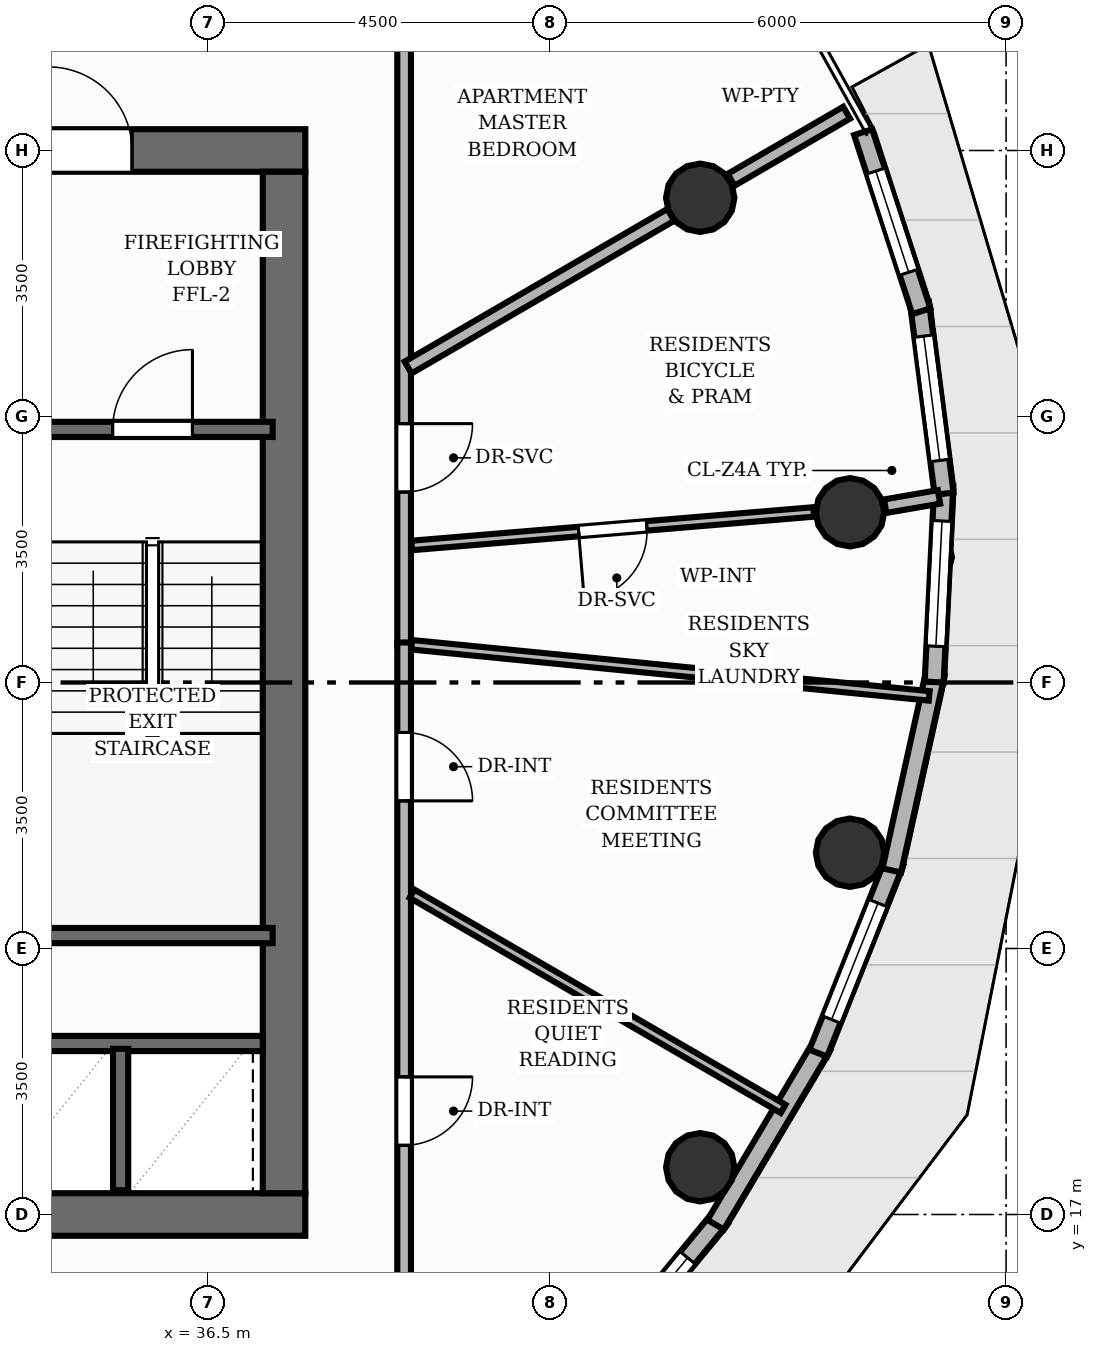
"""IFC4 building model, lengths in metres.
Left out: names, types, materials, properties, quantities, classifications, styles, units other than length and angle.
Written with IfcOpenShell. Run it as: python <this file> out.ifc"""

import sys

from ifc_helpers import new_model, si_unit, direction, frame, frame_2d, origin, origin_2d, place, context, subcontext, project, spatial, rectangle, circle, extrude, element, fill, save


model = new_model("IFC4")
c1 = context("Model", 3, precision=1e-05, world=origin(), true_north=direction((0.0, 1.0)))
c2 = subcontext(c1, "Body", "Model", "MODEL_VIEW")
j1 = project(units=[si_unit("LENGTHUNIT", "METRE"), si_unit("PLANEANGLEUNIT", "RADIAN")], contexts=[c1])
p1 = place(None, origin())
s1 = spatial("IfcSite", under=j1, at=p1, CompositionType="ELEMENT")
p2 = place(p1, origin())
s2 = spatial("IfcBuilding", under=s1, at=p2, CompositionType="ELEMENT")
p3 = place(p2, frame((0.0, 0.0, 185.44)))
s3 = spatial("IfcBuildingStorey", under=s2, at=p3, CompositionType="ELEMENT", Elevation=185.44)
p4 = place(p3, frame((26.22, 17.0, 0.0), z_axis=(0.0, 0.0, 1.0), x_axis=(1.0, 0.0, 0.0)))
e1 = element("IfcWall", 1, at=p4, inside=s3, PredefinedType="SHEAR", context=c2, shape_type="SweptSolid", body=[
    extrude(rectangle(XDim=11.56, YDim=0.56, at=frame_2d((5.78, 0.0))), origin(), (0.0, 0.0, 1.0), 3.2),
])
p5 = place(p4, frame((2.28, 0.0, 0.0)))
e2 = element("IfcOpeningElement", 2, at=p5, cuts=e1, PredefinedType="OPENING", context=c2, shape_type="SweptSolid", body=[
    extrude(rectangle(XDim=1.1, YDim=2.15, at=frame_2d((0.55, 1.075))), frame((0.0, 0.29, 0.0), z_axis=(0.0, -1.0, 0.0), x_axis=(1.0, 0.0, 0.0)), (0.0, 0.0, 1.0), 0.58),
])
p6 = place(p4, frame((5.83, 0.0, 0.0)))
e3 = element("IfcOpeningElement", 3, at=p6, cuts=e1, PredefinedType="OPENING", context=c2, shape_type="SweptSolid", body=[
    extrude(rectangle(XDim=0.9, YDim=2.1, at=frame_2d((0.45, 1.05))), frame((0.0, 0.29, 0.0), z_axis=(0.0, -1.0, 0.0), x_axis=(1.0, 0.0, 0.0)), (0.0, 0.0, 1.0), 0.58),
])
p7 = place(p3, frame((26.22, 31.0, 0.0), z_axis=(0.0, 0.0, 1.0), x_axis=(1.0, 0.0, 0.0)))
e4 = element("IfcWall", 4, at=p7, inside=s3, PredefinedType="SHEAR", context=c2, shape_type="SweptSolid", body=[
    extrude(rectangle(XDim=11.56, YDim=0.56, at=frame_2d((5.78, 0.0))), origin(), (0.0, 0.0, 1.0), 3.2),
])
p8 = place(p7, frame((8.18, 0.0, 0.0)))
e5 = element("IfcOpeningElement", 5, at=p8, cuts=e4, PredefinedType="OPENING", context=c2, shape_type="SweptSolid", body=[
    extrude(rectangle(XDim=1.1, YDim=2.15, at=frame_2d((0.55, 1.075))), frame((0.0, 0.29, 0.0), z_axis=(0.0, -1.0, 0.0), x_axis=(1.0, 0.0, 0.0)), (0.0, 0.0, 1.0), 0.58),
])
p9 = place(p7, frame((0.805, 0.0, 0.0)))
e6 = element("IfcOpeningElement", 6, at=p9, cuts=e4, PredefinedType="OPENING", context=c2, shape_type="SweptSolid", body=[
    extrude(rectangle(XDim=1.05, YDim=2.15, at=frame_2d((0.525, 1.075))), frame((0.0, 0.29, 0.0), z_axis=(0.0, -1.0, 0.0), x_axis=(1.0, 0.0, 0.0)), (0.0, 0.0, 1.0), 0.58),
])
p10 = place(p7, frame((2.555, 0.0, 0.0)))
e7 = element("IfcOpeningElement", 7, at=p10, cuts=e4, PredefinedType="OPENING", context=c2, shape_type="SweptSolid", body=[
    extrude(rectangle(XDim=1.05, YDim=2.15, at=frame_2d((0.525, 1.075))), frame((0.0, 0.29, 0.0), z_axis=(0.0, -1.0, 0.0), x_axis=(1.0, 0.0, 0.0)), (0.0, 0.0, 1.0), 0.58),
])
p11 = place(p7, frame((4.305, 0.0, 0.0)))
e8 = element("IfcOpeningElement", 8, at=p11, cuts=e4, PredefinedType="OPENING", context=c2, shape_type="SweptSolid", body=[
    extrude(rectangle(XDim=1.05, YDim=2.15, at=frame_2d((0.525, 1.075))), frame((0.0, 0.29, 0.0), z_axis=(0.0, -1.0, 0.0), x_axis=(1.0, 0.0, 0.0)), (0.0, 0.0, 1.0), 0.58),
])
p12 = place(p3, frame((37.5, 17.28, 0.0), z_axis=(0.0, 0.0, 1.0), x_axis=(0.0, 1.0, 0.0)))
e9 = element("IfcWall", 9, at=p12, inside=s3, PredefinedType="SHEAR", context=c2, shape_type="SweptSolid", body=[
    extrude(rectangle(XDim=13.44, YDim=0.56, at=frame_2d((6.72, 0.0))), origin(), (0.0, 0.0, 1.0), 3.2),
])
for number, where, z_axis, x_axis in (
    (10, (44.946, 26.24, 0.0), (0.0, 0.0, 1.0), (1.0, 0.0, 0.0)),
    (11, (42.975, 30.378, 0.0), (0.0, 0.0, 1.0), (1.0, 0.0, 0.0)),
    (12, (42.975, 17.622, 0.0), (0.0, 0.0, 1.0), (1.0, 0.0, 0.0)),
    (13, (44.946, 21.76, 0.0), (0.0, 0.0, 1.0), (1.0, 0.0, 0.0)),
):
    element("IfcColumn", number, at=place(p3, frame(where, z_axis=z_axis, x_axis=x_axis)), inside=s3, PredefinedType="COLUMN", context=c2, shape_type="SweptSolid", body=[
        extrude(circle(Radius=0.45, at=origin_2d()), origin(), (0.0, 0.0, 1.0), 3.2),
    ])
p13 = place(p3, frame((43.241, 16.955, 0.0), z_axis=(0.0, 0.0, 1.0), x_axis=(-0.635409334306, -0.772175483861, 0.0)))
e14 = element("IfcWall", 14, at=p13, inside=s3, PredefinedType="SOLIDWALL", context=c2, shape_type="SweptSolid", body=[
    extrude(rectangle(XDim=2.758, YDim=0.25, at=frame_2d((1.379, 0.0))), origin(), (0.0, 0.0, 1.0), 2.96),
])
p14 = place(p13, frame((0.679, 0.0, 0.85)))
e15 = element("IfcOpeningElement", 15, at=p14, cuts=e14, PredefinedType="OPENING", context=c2, shape_type="SweptSolid", body=[
    extrude(rectangle(XDim=1.4, YDim=1.55, at=frame_2d((0.7, 0.775))), frame((0.0, 0.135, 0.0), z_axis=(0.0, -1.0, 0.0), x_axis=(1.0, 0.0, 0.0)), (0.0, 0.0, 1.0), 0.27),
])
p15 = place(p3, frame((44.576, 19.221, 0.0), z_axis=(0.0, 0.0, 1.0), x_axis=(-0.510320389621, -0.859984360287, 0.0)))
e16 = element("IfcWall", 16, at=p15, inside=s3, PredefinedType="SOLIDWALL", context=c2, shape_type="SweptSolid", body=[
    extrude(rectangle(XDim=2.738, YDim=0.25, at=frame_2d((1.369, 0.0))), origin(), (0.0, 0.0, 1.0), 2.96),
])
p16 = place(p3, frame((45.528, 21.633, 0.0), z_axis=(0.0, 0.0, 1.0), x_axis=(-0.370330939431, -0.928899884433, 0.0)))
e17 = element("IfcWall", 17, at=p16, inside=s3, PredefinedType="SOLIDWALL", context=c2, shape_type="SweptSolid", body=[
    extrude(rectangle(XDim=2.702, YDim=0.25, at=frame_2d((1.351, 0.0))), origin(), (0.0, 0.0, 1.0), 2.96),
])
p17 = place(p16, frame((0.576, 0.0, 0.85)))
e18 = element("IfcOpeningElement", 18, at=p17, cuts=e17, PredefinedType="OPENING", context=c2, shape_type="SweptSolid", body=[
    extrude(rectangle(XDim=1.65, YDim=1.55, at=frame_2d((0.825, 0.775))), frame((0.0, 0.135, 0.0), z_axis=(0.0, -1.0, 0.0), x_axis=(1.0, 0.0, 0.0)), (0.0, 0.0, 1.0), 0.27),
])
p18 = place(p3, frame((46.068, 24.116, 0.0), z_axis=(0.0, 0.0, 1.0), x_axis=(-0.215877166516, -0.976420528756, 0.0)))
e19 = element("IfcWall", 19, at=p18, inside=s3, PredefinedType="SOLIDWALL", context=c2, shape_type="SweptSolid", body=[
    extrude(rectangle(XDim=2.651, YDim=0.25, at=frame_2d((1.325, 0.0))), origin(), (0.0, 0.0, 1.0), 2.96),
])
p19 = place(p3, frame((46.18, 26.595, 0.0), z_axis=(0.0, 0.0, 1.0), x_axis=(-0.048688181414, -0.99881402723, 0.0)))
e20 = element("IfcWall", 20, at=p19, inside=s3, PredefinedType="SOLIDWALL", context=c2, shape_type="SweptSolid", body=[
    extrude(rectangle(XDim=2.593, YDim=0.25, at=frame_2d((1.296, 0.0))), origin(), (0.0, 0.0, 1.0), 2.96),
])
p20 = place(p19, frame((0.471, 0.0, 0.85)))
e21 = element("IfcOpeningElement", 21, at=p20, cuts=e20, PredefinedType="OPENING", context=c2, shape_type="SweptSolid", body=[
    extrude(rectangle(XDim=1.65, YDim=1.55, at=frame_2d((0.825, 0.775))), frame((0.0, 0.135, 0.0), z_axis=(0.0, -1.0, 0.0), x_axis=(1.0, 0.0, 0.0)), (0.0, 0.0, 1.0), 0.27),
])
p21 = place(p3, frame((45.86, 28.995, 0.0), z_axis=(0.0, 0.0, 1.0), x_axis=(0.128057007482, -0.991766808698, 0.0)))
e22 = element("IfcWall", 22, at=p21, inside=s3, PredefinedType="SOLIDWALL", context=c2, shape_type="SweptSolid", body=[
    extrude(rectangle(XDim=2.532, YDim=0.25, at=frame_2d((1.266, 0.0))), origin(), (0.0, 0.0, 1.0), 2.96),
])
p22 = place(p21, frame((0.441, 0.0, 0.85)))
e23 = element("IfcOpeningElement", 23, at=p22, cuts=e22, PredefinedType="OPENING", context=c2, shape_type="SweptSolid", body=[
    extrude(rectangle(XDim=1.65, YDim=1.55, at=frame_2d((0.825, 0.775))), frame((0.0, 0.135, 0.0), z_axis=(0.0, -1.0, 0.0), x_axis=(1.0, 0.0, 0.0)), (0.0, 0.0, 1.0), 0.27),
])
p23 = place(p3, frame((45.119, 31.241, 0.0), z_axis=(0.0, 0.0, 1.0), x_axis=(0.309005861828, -0.951060133407, 0.0)))
e24 = element("IfcWall", 24, at=p23, inside=s3, PredefinedType="SOLIDWALL", context=c2, shape_type="SweptSolid", body=[
    extrude(rectangle(XDim=2.478, YDim=0.25, at=frame_2d((1.239, 0.0))), origin(), (0.0, 0.0, 1.0), 2.96),
])
p24 = place(p23, frame((0.539, 0.0, 0.85)))
e25 = element("IfcOpeningElement", 25, at=p24, cuts=e24, PredefinedType="OPENING", context=c2, shape_type="SweptSolid", body=[
    extrude(rectangle(XDim=1.4, YDim=1.55, at=frame_2d((0.7, 0.775))), frame((0.0, 0.135, 0.0), z_axis=(0.0, -1.0, 0.0), x_axis=(1.0, 0.0, 0.0)), (0.0, 0.0, 1.0), 0.27),
])
p25 = place(p3, frame((34.11, 20.67, 0.0), z_axis=(0.0, 0.0, 1.0), x_axis=(1.0, 0.0, 0.0)))
e26 = element("IfcWall", 26, at=p25, inside=s3, PredefinedType="SHEAR", context=c2, shape_type="SweptSolid", body=[
    extrude(rectangle(XDim=3.24, YDim=0.2, at=frame_2d((1.62, 0.0))), origin(), (0.0, 0.0, 1.0), 3.2),
])
p26 = place(p3, frame((34.11, 27.33, 0.0), z_axis=(0.0, 0.0, 1.0), x_axis=(1.0, 0.0, 0.0)))
e27 = element("IfcWall", 27, at=p26, inside=s3, PredefinedType="SHEAR", context=c2, shape_type="SweptSolid", body=[
    extrude(rectangle(XDim=3.24, YDim=0.2, at=frame_2d((1.62, 0.0))), origin(), (0.0, 0.0, 1.0), 3.2),
])
p27 = place(p26, frame((1.135, 0.0, 0.0)))
e28 = element("IfcOpeningElement", 28, at=p27, cuts=e27, PredefinedType="OPENING", context=c2, shape_type="SweptSolid", body=[
    extrude(rectangle(XDim=1.05, YDim=2.15, at=frame_2d((0.525, 1.075))), frame((0.0, 0.11, 0.0), z_axis=(0.0, -1.0, 0.0), x_axis=(1.0, 0.0, 0.0)), (0.0, 0.0, 1.0), 0.22),
])
p28 = place(p3, frame((33.5, 19.25, 0.0), z_axis=(0.0, 0.0, 1.0), x_axis=(1.0, 0.0, 0.0)))
e29 = element("IfcWall", 29, at=p28, inside=s3, PredefinedType="SHEAR", context=c2, shape_type="SweptSolid", body=[
    extrude(rectangle(XDim=3.72, YDim=0.2, at=frame_2d((1.86, 0.0))), origin(), (0.0, 0.0, 1.0), 3.2),
])
p29 = place(p3, frame((35.35, 17.32, 0.0), z_axis=(0.0, 0.0, 1.0), x_axis=(0.0, 1.0, 0.0)))
e30 = element("IfcWall", 30, at=p29, inside=s3, PredefinedType="SHEAR", context=c2, shape_type="SweptSolid", body=[
    extrude(rectangle(XDim=1.86, YDim=0.2, at=frame_2d((0.93, 0.0))), origin(), (0.0, 0.0, 1.0), 3.2),
])
p30 = place(p3, frame((45.409, 26.32, 0.0), z_axis=(0.0, 0.0, 1.0), x_axis=(0.985336223431, 0.170623933826, 0.0)))
e31 = element("IfcWall", 31, at=p30, inside=s3, PredefinedType="PARTITIONING", context=c2, shape_type="SweptSolid", body=[
    extrude(rectangle(XDim=0.718, YDim=0.18, at=frame_2d((0.359, 0.0))), origin(), (0.0, 0.0, 1.0), 2.404),
])
p31 = place(p3, frame((43.382, 30.614, 0.0), z_axis=(0.0, 0.0, 1.0), x_axis=(0.86461381872, 0.502437005482, 0.0)))
e32 = element("IfcWall", 32, at=p31, inside=s3, PredefinedType="PARTITIONING", context=c2, shape_type="SweptSolid", body=[
    extrude(rectangle(XDim=1.758, YDim=0.18, at=frame_2d((0.879, 0.0))), origin(), (0.0, 0.0, 1.0), 2.404),
])
p32 = place(p3, frame((39.08, 32.58, 0.0), z_axis=(0.0, 0.0, 1.0), x_axis=(0.0, -1.0, 0.0)))
e33 = element("IfcWall", 33, at=p32, inside=s3, PredefinedType="PARTITIONING", context=c2, shape_type="SweptSolid", body=[
    extrude(rectangle(XDim=8.094, YDim=0.18, at=frame_2d((4.047, 0.0))), origin(), (0.0, 0.0, 1.0), 2.955),
])
p33 = place(p32, frame((5.174, 0.0, 0.0)))
e34 = element("IfcOpeningElement", 34, at=p33, cuts=e33, PredefinedType="OPENING", context=c2, shape_type="SweptSolid", body=[
    extrude(rectangle(XDim=0.9, YDim=2.1, at=frame_2d((0.45, 1.05))), frame((0.0, 0.1, 0.0), z_axis=(0.0, -1.0, 0.0), x_axis=(1.0, 0.0, 0.0)), (0.0, 0.0, 1.0), 0.2),
])
p34 = place(p3, frame((39.08, 24.526, 0.0), z_axis=(0.0, 0.0, 1.0), x_axis=(0.0, -1.0, 0.0)))
e35 = element("IfcWall", 35, at=p34, inside=s3, PredefinedType="PARTITIONING", context=c2, shape_type="SweptSolid", body=[
    extrude(rectangle(XDim=9.106, YDim=0.18, at=frame_2d((4.553, 0.0))), origin(), (0.0, 0.0, 1.0), 2.955),
])
p35 = place(p34, frame((1.184, 0.0, 0.0)))
e36 = element("IfcOpeningElement", 36, at=p35, cuts=e35, PredefinedType="OPENING", context=c2, shape_type="SweptSolid", body=[
    extrude(rectangle(XDim=0.9, YDim=2.1, at=frame_2d((0.45, 1.05))), frame((0.0, 0.1, 0.0), z_axis=(0.0, -1.0, 0.0), x_axis=(1.0, 0.0, 0.0)), (0.0, 0.0, 1.0), 0.2),
])
p36 = place(p34, frame((5.716, 0.0, 0.0)))
e37 = element("IfcOpeningElement", 37, at=p36, cuts=e35, PredefinedType="OPENING", context=c2, shape_type="SweptSolid", body=[
    extrude(rectangle(XDim=0.9, YDim=2.1, at=frame_2d((0.45, 1.05))), frame((0.0, 0.1, 0.0), z_axis=(0.0, -1.0, 0.0), x_axis=(1.0, 0.0, 0.0)), (0.0, 0.0, 1.0), 0.2),
])
p37 = place(p3, frame((44.468, 26.244, 0.0), z_axis=(0.0, 0.0, 1.0), x_axis=(-0.996538774807, -0.083129238578, 0.0)))
e38 = element("IfcWall", 38, at=p37, inside=s3, PredefinedType="PARTITIONING", context=c2, shape_type="SweptSolid", body=[
    extrude(rectangle(XDim=5.307, YDim=0.125, at=frame_2d((2.653, 0.0))), origin(), (0.0, 0.0, 1.0), 2.404),
])
p38 = place(p37, frame((2.204, 0.0, 0.0)))
e39 = element("IfcOpeningElement", 39, at=p38, cuts=e38, PredefinedType="OPENING", context=c2, shape_type="SweptSolid", body=[
    extrude(rectangle(XDim=0.9, YDim=2.1, at=frame_2d((0.45, 1.05))), frame((0.0, 0.073, 0.0), z_axis=(0.0, -1.0, 0.0), x_axis=(1.0, 0.0, 0.0)), (0.0, 0.0, 1.0), 0.145),
])
p39 = place(p3, frame((39.132, 28.144, 0.0), z_axis=(0.0, 0.0, 1.0), x_axis=(0.864597268714, 0.502465484319, 0.0)))
e40 = element("IfcWall", 40, at=p39, inside=s3, PredefinedType="PARTITIONING", context=c2, shape_type="SweptSolid", body=[
    extrude(rectangle(XDim=3.998, YDim=0.18, at=frame_2d((1.999, 0.0))), origin(), (0.0, 0.0, 1.0), 2.404),
])
p40 = place(p3, frame((44.066, 18.39, 0.0), z_axis=(0.0, 0.0, 1.0), x_axis=(-0.865092390625, 0.501612555348, 0.0)))
e41 = element("IfcWall", 41, at=p40, inside=s3, PredefinedType="PARTITIONING", context=c2, shape_type="SweptSolid", body=[
    extrude(rectangle(XDim=5.643, YDim=0.125, at=frame_2d((2.822, 0.0))), origin(), (0.0, 0.0, 1.0), 2.692),
])
p41 = place(p3, frame((39.179, 24.497, 0.0), z_axis=(0.0, 0.0, 1.0), x_axis=(0.995152744832, -0.098341316102, 0.0)))
e42 = element("IfcWall", 42, at=p41, inside=s3, PredefinedType="PARTITIONING", context=c2, shape_type="SweptSolid", body=[
    extrude(rectangle(XDim=6.842, YDim=0.125, at=frame_2d((3.421, 0.0))), origin(), (0.0, 0.0, 1.0), 2.692),
])
p42 = place(p14, origin())
e43 = element("IfcWindow", 43, at=p42, inside=s3, PartitioningType="SINGLE_PANEL", PredefinedType="WINDOW", context=c2, shape_type="SweptSolid", body=[
    extrude(rectangle(XDim=1.4, YDim=1.55, at=frame_2d((0.7, 0.775))), frame((0.0, 0.03, 0.0), z_axis=(0.0, -1.0, 0.0), x_axis=(1.0, 0.0, 0.0)), (0.0, 0.0, 1.0), 0.06),
])
fill(e15, e43)
p43 = place(p17, origin())
e44 = element("IfcWindow", 44, at=p43, inside=s3, PartitioningType="SINGLE_PANEL", PredefinedType="WINDOW", context=c2, shape_type="SweptSolid", body=[
    extrude(rectangle(XDim=1.65, YDim=1.55, at=frame_2d((0.825, 0.775))), frame((0.0, 0.03, 0.0), z_axis=(0.0, -1.0, 0.0), x_axis=(1.0, 0.0, 0.0)), (0.0, 0.0, 1.0), 0.06),
])
fill(e18, e44)
p44 = place(p20, origin())
e45 = element("IfcWindow", 45, at=p44, inside=s3, PartitioningType="SINGLE_PANEL", PredefinedType="WINDOW", context=c2, shape_type="SweptSolid", body=[
    extrude(rectangle(XDim=1.65, YDim=1.55, at=frame_2d((0.825, 0.775))), frame((0.0, 0.03, 0.0), z_axis=(0.0, -1.0, 0.0), x_axis=(1.0, 0.0, 0.0)), (0.0, 0.0, 1.0), 0.06),
])
fill(e21, e45)
p45 = place(p22, origin())
e46 = element("IfcWindow", 46, at=p45, inside=s3, PartitioningType="SINGLE_PANEL", PredefinedType="WINDOW", context=c2, shape_type="SweptSolid", body=[
    extrude(rectangle(XDim=1.65, YDim=1.55, at=frame_2d((0.825, 0.775))), frame((0.0, 0.03, 0.0), z_axis=(0.0, -1.0, 0.0), x_axis=(1.0, 0.0, 0.0)), (0.0, 0.0, 1.0), 0.06),
])
fill(e23, e46)
p46 = place(p24, origin())
e47 = element("IfcWindow", 47, at=p46, inside=s3, PartitioningType="SINGLE_PANEL", PredefinedType="WINDOW", context=c2, shape_type="SweptSolid", body=[
    extrude(rectangle(XDim=1.4, YDim=1.55, at=frame_2d((0.7, 0.775))), frame((0.0, 0.03, 0.0), z_axis=(0.0, -1.0, 0.0), x_axis=(1.0, 0.0, 0.0)), (0.0, 0.0, 1.0), 0.06),
])
fill(e25, e47)
p47 = place(p27, origin())
e48 = element("IfcDoor", 48, at=p47, inside=s3, OperationType="SINGLE_SWING_RIGHT", PredefinedType="DOOR", context=c2, shape_type="SweptSolid", body=[
    extrude(rectangle(XDim=1.05, YDim=2.15, at=frame_2d((0.525, 1.075))), frame((0.0, 0.025, 0.0), z_axis=(0.0, -1.0, 0.0), x_axis=(1.0, 0.0, 0.0)), (0.0, 0.0, 1.0), 0.05),
])
fill(e28, e48)
p48 = place(p8, origin())
e49 = element("IfcDoor", 49, at=p48, inside=s3, OperationType="SINGLE_SWING_LEFT", PredefinedType="DOOR", context=c2, shape_type="SweptSolid", body=[
    extrude(rectangle(XDim=1.1, YDim=2.15, at=frame_2d((0.55, 1.075))), frame((0.0, 0.025, 0.0), z_axis=(0.0, -1.0, 0.0), x_axis=(1.0, 0.0, 0.0)), (0.0, 0.0, 1.0), 0.05),
])
fill(e5, e49)
p49 = place(p33, origin())
e50 = element("IfcDoor", 50, at=p49, inside=s3, OperationType="SINGLE_SWING_LEFT", PredefinedType="DOOR", context=c2, shape_type="SweptSolid", body=[
    extrude(rectangle(XDim=0.9, YDim=2.1, at=frame_2d((0.45, 1.05))), frame((0.0, 0.025, 0.0), z_axis=(0.0, -1.0, 0.0), x_axis=(1.0, 0.0, 0.0)), (0.0, 0.0, 1.0), 0.05),
])
fill(e34, e50)
p50 = place(p35, origin())
e51 = element("IfcDoor", 51, at=p50, inside=s3, OperationType="SINGLE_SWING_RIGHT", PredefinedType="DOOR", context=c2, shape_type="SweptSolid", body=[
    extrude(rectangle(XDim=0.9, YDim=2.1, at=frame_2d((0.45, 1.05))), frame((0.0, 0.025, 0.0), z_axis=(0.0, -1.0, 0.0), x_axis=(1.0, 0.0, 0.0)), (0.0, 0.0, 1.0), 0.05),
])
fill(e36, e51)
p51 = place(p36, origin())
e52 = element("IfcDoor", 52, at=p51, inside=s3, OperationType="SINGLE_SWING_LEFT", PredefinedType="DOOR", context=c2, shape_type="SweptSolid", body=[
    extrude(rectangle(XDim=0.9, YDim=2.1, at=frame_2d((0.45, 1.05))), frame((0.0, 0.025, 0.0), z_axis=(0.0, -1.0, 0.0), x_axis=(1.0, 0.0, 0.0)), (0.0, 0.0, 1.0), 0.05),
])
fill(e37, e52)
p52 = place(p38, origin())
e53 = element("IfcDoor", 53, at=p52, inside=s3, OperationType="SINGLE_SWING_RIGHT", PredefinedType="DOOR", context=c2, shape_type="SweptSolid", body=[
    extrude(rectangle(XDim=0.9, YDim=2.1, at=frame_2d((0.45, 1.05))), frame((0.0, 0.025, 0.0), z_axis=(0.0, -1.0, 0.0), x_axis=(1.0, 0.0, 0.0)), (0.0, 0.0, 1.0), 0.05),
])
fill(e39, e53)
save(model, sys.argv[1])
